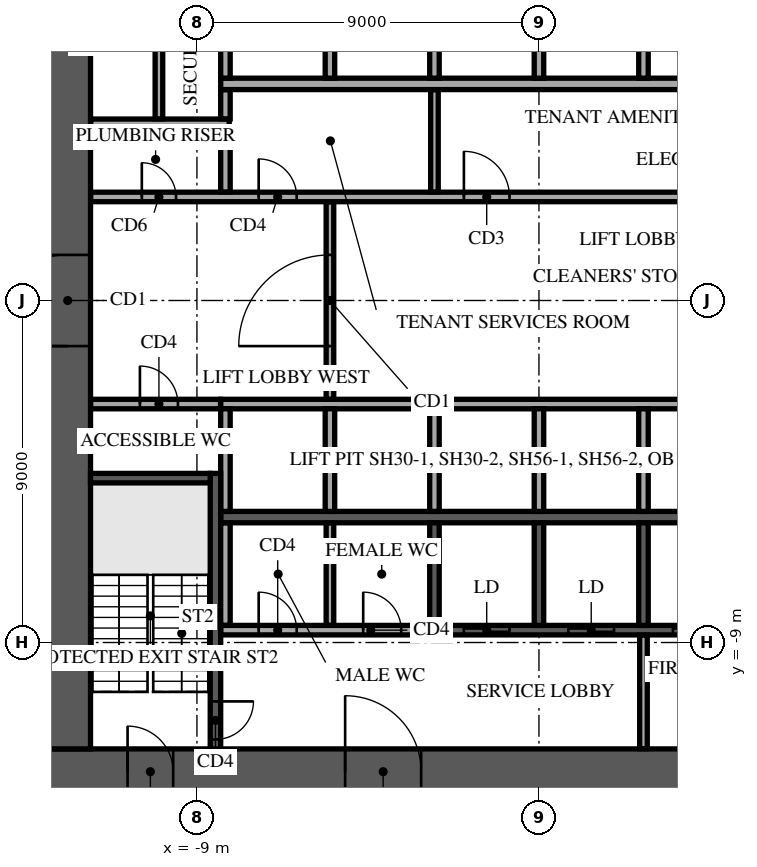
"""IFC4 building model, lengths in metres.
Left out: names, types, materials, properties, quantities, classifications, styles, units other than length and angle.
Written with IfcOpenShell. Run it as: python <this file> out.ifc"""

import sys

from ifc_helpers import new_model, si_unit, direction, frame, frame_2d, origin, place, context, subcontext, project, spatial, rectangle, extrude, element, fill, save


model = new_model("IFC4")
c1 = context("Model", 3, precision=1e-05, world=origin(), true_north=direction((0.0, 1.0)))
c2 = subcontext(c1, "Body", "Model", "MODEL_VIEW")
j1 = project(units=[si_unit("LENGTHUNIT", "METRE"), si_unit("PLANEANGLEUNIT", "RADIAN")], contexts=[c1])
p1 = place(None, origin())
s1 = spatial("IfcSite", under=j1, at=p1, CompositionType="ELEMENT")
p2 = place(p1, origin())
s2 = spatial("IfcBuilding", under=s1, at=p2, CompositionType="ELEMENT")
p3 = place(p2, frame((0.0, 0.0, -4.5)))
s3 = spatial("IfcBuildingStorey", under=s2, at=p3, CompositionType="ELEMENT", Elevation=-4.5)
p4 = place(p3, frame((-13.0, -12.4, 0.0), z_axis=(0.0, 0.0, 1.0), x_axis=(1.0, 0.0, 0.0)))
e1 = element("IfcWall", 1, at=p4, inside=s3, PredefinedType="SHEAR", context=c2, shape_type="SweptSolid", body=[
    extrude(rectangle(XDim=26.0, YDim=1.2, at=frame_2d((13.0, 0.0))), origin(), (0.0, 0.0, 1.0), 4.1),
])
p5 = place(p4, frame((7.9, 0.0, 0.0)))
e2 = element("IfcOpeningElement", 2, at=p5, cuts=e1, PredefinedType="OPENING", context=c2, shape_type="SweptSolid", body=[
    extrude(rectangle(XDim=2.0, YDim=2.1, at=frame_2d((1.0, 1.05))), frame((0.0, 0.61, 0.0), z_axis=(0.0, -1.0, 0.0), x_axis=(1.0, 0.0, 0.0)), (0.0, 0.0, 1.0), 1.22),
])
p6 = place(p4, frame((18.025, 0.0, 0.0)))
e3 = element("IfcOpeningElement", 3, at=p6, cuts=e1, PredefinedType="OPENING", context=c2, shape_type="SweptSolid", body=[
    extrude(rectangle(XDim=1.2, YDim=2.1, at=frame_2d((0.6, 1.05))), frame((0.0, 0.61, 0.0), z_axis=(0.0, -1.0, 0.0), x_axis=(1.0, 0.0, 0.0)), (0.0, 0.0, 1.0), 1.22),
])
p7 = place(p4, frame((2.175, 0.0, 0.0)))
e4 = element("IfcOpeningElement", 4, at=p7, cuts=e1, PredefinedType="OPENING", context=c2, shape_type="SweptSolid", body=[
    extrude(rectangle(XDim=1.2, YDim=2.1, at=frame_2d((0.6, 1.05))), frame((0.0, 0.61, 0.0), z_axis=(0.0, -1.0, 0.0), x_axis=(1.0, 0.0, 0.0)), (0.0, 0.0, 1.0), 1.22),
])
p8 = place(p4, frame((22.625, 0.0, 0.0)))
e5 = element("IfcOpeningElement", 5, at=p8, cuts=e1, PredefinedType="OPENING", context=c2, shape_type="SweptSolid", body=[
    extrude(rectangle(XDim=1.2, YDim=2.1, at=frame_2d((0.6, 1.05))), frame((0.0, 0.61, 0.0), z_axis=(0.0, -1.0, 0.0), x_axis=(1.0, 0.0, 0.0)), (0.0, 0.0, 1.0), 1.22),
])
p9 = place(p3, frame((-12.4, -11.8, 0.0), z_axis=(0.0, 0.0, 1.0), x_axis=(0.0, 1.0, 0.0)))
e6 = element("IfcWall", 6, at=p9, inside=s3, PredefinedType="SHEAR", context=c2, shape_type="SweptSolid", body=[
    extrude(rectangle(XDim=23.6, YDim=1.2, at=frame_2d((11.8, 0.0))), origin(), (0.0, 0.0, 1.0), 4.1),
])
p10 = place(p9, frame((10.6, 0.0, 0.0)))
e7 = element("IfcOpeningElement", 7, at=p10, cuts=e6, PredefinedType="OPENING", context=c2, shape_type="SweptSolid", body=[
    extrude(rectangle(XDim=2.4, YDim=2.4, at=frame_2d((1.2, 1.2))), frame((0.0, 0.61, 0.0), z_axis=(0.0, -1.0, 0.0), x_axis=(1.0, 0.0, 0.0)), (0.0, 0.0, 1.0), 1.22),
])
for number, where, z_axis, x_axis in (
    (8, (-8.375, 5.7, 0.0), (0.0, 0.0, 1.0), (1.0, 0.0, 0.0)),
    (9, (-8.375, -5.7, 0.0), (0.0, 0.0, 1.0), (1.0, 0.0, 0.0)),
):
    element("IfcWall", number, at=place(p3, frame(where, z_axis=z_axis, x_axis=x_axis)), inside=s3, PredefinedType="SOLIDWALL", context=c2, shape_type="SweptSolid", body=[
        extrude(rectangle(XDim=16.75, YDim=0.3, at=frame_2d((8.375, 0.0))), origin(), (0.0, 0.0, 1.0), 4.1),
    ])
for number, where, z_axis, x_axis in (
    (10, (-8.25, 5.85, 0.0), (0.0, 0.0, 1.0), (0.0, 1.0, 0.0)),
    (11, (-5.5, 5.85, 0.0), (0.0, 0.0, 1.0), (0.0, 1.0, 0.0)),
    (12, (-2.75, 5.85, 0.0), (0.0, 0.0, 1.0), (0.0, 1.0, 0.0)),
    (13, (0.0, 5.85, 0.0), (0.0, 0.0, 1.0), (0.0, 1.0, 0.0)),
    (14, (2.75, 5.85, 0.0), (0.0, 0.0, 1.0), (0.0, 1.0, 0.0)),
):
    element("IfcWall", number, at=place(p3, frame(where, z_axis=z_axis, x_axis=x_axis)), inside=s3, PredefinedType="SOLIDWALL", context=c2, shape_type="SweptSolid", body=[
        extrude(rectangle(XDim=2.7, YDim=0.25, at=frame_2d((1.35, 0.0))), origin(), (0.0, 0.0, 1.0), 4.1),
    ])
p11 = place(p3, frame((-8.375, -2.725, 0.0), z_axis=(0.0, 0.0, 1.0), x_axis=(1.0, 0.0, 0.0)))
e15 = element("IfcWall", 15, at=p11, inside=s3, PredefinedType="SOLIDWALL", context=c2, shape_type="SweptSolid", body=[
    extrude(rectangle(XDim=14.0, YDim=0.25, at=frame_2d((7.0, 0.0))), origin(), (0.0, 0.0, 1.0), 4.1),
])
for number, where, z_axis, x_axis in (
    (16, (-8.25, -5.55, 0.0), (0.0, 0.0, 1.0), (0.0, 1.0, 0.0)),
    (17, (-5.5, -5.55, 0.0), (0.0, 0.0, 1.0), (0.0, 1.0, 0.0)),
    (18, (-2.75, -5.55, 0.0), (0.0, 0.0, 1.0), (0.0, 1.0, 0.0)),
    (19, (0.0, -5.55, 0.0), (0.0, 0.0, 1.0), (0.0, 1.0, 0.0)),
    (20, (2.75, -5.55, 0.0), (0.0, 0.0, 1.0), (0.0, 1.0, 0.0)),
):
    element("IfcWall", number, at=place(p3, frame(where, z_axis=z_axis, x_axis=x_axis)), inside=s3, PredefinedType="SOLIDWALL", context=c2, shape_type="SweptSolid", body=[
        extrude(rectangle(XDim=2.7, YDim=0.25, at=frame_2d((1.35, 0.0))), origin(), (0.0, 0.0, 1.0), 4.1),
    ])
p12 = place(p3, frame((-2.875, -8.675, 0.0), z_axis=(0.0, 0.0, 1.0), x_axis=(1.0, 0.0, 0.0)))
e21 = element("IfcWall", 21, at=p12, inside=s3, PredefinedType="SOLIDWALL", context=c2, shape_type="SweptSolid", body=[
    extrude(rectangle(XDim=11.25, YDim=0.25, at=frame_2d((5.625, 0.0))), origin(), (0.0, 0.0, 1.0), 4.1),
])
p13 = place(p12, frame((0.9, 0.0, 0.0)))
e22 = element("IfcOpeningElement", 22, at=p13, cuts=e21, PredefinedType="OPENING", context=c2, shape_type="SweptSolid", body=[
    extrude(rectangle(XDim=1.2, YDim=2.1, at=frame_2d((0.6, 1.05))), frame((0.0, 0.135, 0.0), z_axis=(0.0, -1.0, 0.0), x_axis=(1.0, 0.0, 0.0)), (0.0, 0.0, 1.0), 0.27),
])
p14 = place(p12, frame((3.65, 0.0, 0.0)))
e23 = element("IfcOpeningElement", 23, at=p14, cuts=e21, PredefinedType="OPENING", context=c2, shape_type="SweptSolid", body=[
    extrude(rectangle(XDim=1.2, YDim=2.1, at=frame_2d((0.6, 1.05))), frame((0.0, 0.135, 0.0), z_axis=(0.0, -1.0, 0.0), x_axis=(1.0, 0.0, 0.0)), (0.0, 0.0, 1.0), 0.27),
])
p15 = place(p12, frame((6.4, 0.0, 0.0)))
e24 = element("IfcOpeningElement", 24, at=p15, cuts=e21, PredefinedType="OPENING", context=c2, shape_type="SweptSolid", body=[
    extrude(rectangle(XDim=1.2, YDim=2.1, at=frame_2d((0.6, 1.05))), frame((0.0, 0.135, 0.0), z_axis=(0.0, -1.0, 0.0), x_axis=(1.0, 0.0, 0.0)), (0.0, 0.0, 1.0), 0.27),
])
p16 = place(p12, frame((9.15, 0.0, 0.0)))
e25 = element("IfcOpeningElement", 25, at=p16, cuts=e21, PredefinedType="OPENING", context=c2, shape_type="SweptSolid", body=[
    extrude(rectangle(XDim=1.2, YDim=2.1, at=frame_2d((0.6, 1.05))), frame((0.0, 0.135, 0.0), z_axis=(0.0, -1.0, 0.0), x_axis=(1.0, 0.0, 0.0)), (0.0, 0.0, 1.0), 0.27),
])
for number, where, z_axis, x_axis in (
    (26, (-2.75, -8.55, 0.0), (0.0, 0.0, 1.0), (0.0, 1.0, 0.0)),
    (27, (0.0, -8.55, 0.0), (0.0, 0.0, 1.0), (0.0, 1.0, 0.0)),
    (28, (2.75, -8.55, 0.0), (0.0, 0.0, 1.0), (0.0, 1.0, 0.0)),
):
    element("IfcWall", number, at=place(p3, frame(where, z_axis=z_axis, x_axis=x_axis)), inside=s3, PredefinedType="SOLIDWALL", context=c2, shape_type="SweptSolid", body=[
        extrude(rectangle(XDim=2.7, YDim=0.25, at=frame_2d((1.35, 0.0))), origin(), (0.0, 0.0, 1.0), 4.1),
    ])
p17 = place(p3, frame((-8.512, -4.55, 0.0), z_axis=(0.0, 0.0, 1.0), x_axis=(0.0, -1.0, 0.0)))
e29 = element("IfcWall", 29, at=p17, inside=s3, PredefinedType="SOLIDWALL", context=c2, shape_type="SweptSolid", body=[
    extrude(rectangle(XDim=7.25, YDim=0.275, at=frame_2d((3.625, 0.0))), origin(), (0.0, 0.0, 1.0), 4.1),
])
p18 = place(p17, frame((6.0, 0.0, 0.0)))
e30 = element("IfcOpeningElement", 30, at=p18, cuts=e29, PredefinedType="OPENING", context=c2, shape_type="SweptSolid", body=[
    extrude(rectangle(XDim=1.0, YDim=2.1, at=frame_2d((0.5, 1.05))), frame((0.0, 0.147, 0.0), z_axis=(0.0, -1.0, 0.0), x_axis=(1.0, 0.0, 0.0)), (0.0, 0.0, 1.0), 0.295),
])
p19 = place(p3, frame((-8.65, -4.675, 0.0), z_axis=(0.0, 0.0, 1.0), x_axis=(-1.0, 0.0, 0.0)))
e31 = element("IfcWall", 31, at=p19, inside=s3, PredefinedType="SOLIDWALL", context=c2, shape_type="SweptSolid", body=[
    extrude(rectangle(XDim=3.15, YDim=0.25, at=frame_2d((1.575, 0.0))), origin(), (0.0, 0.0, 1.0), 4.1),
])
p20 = place(p3, frame((2.75, -11.795, 0.0), z_axis=(0.0, 0.0, 1.0), x_axis=(0.0, 1.0, 0.0)))
e32 = element("IfcWall", 32, at=p20, inside=s3, PredefinedType="PARTITIONING", context=c2, shape_type="SweptSolid", body=[
    extrude(rectangle(XDim=2.99, YDim=0.2, at=frame_2d((1.495, 0.0))), origin(), (0.0, 0.0, 1.0), 4.1),
])
p21 = place(p3, frame((-8.37, -8.675, 0.0), z_axis=(0.0, 0.0, 1.0), x_axis=(1.0, 0.0, 0.0)))
e33 = element("IfcWall", 33, at=p21, inside=s3, PredefinedType="PARTITIONING", context=c2, shape_type="SweptSolid", body=[
    extrude(rectangle(XDim=5.49, YDim=0.25, at=frame_2d((2.745, 0.0))), origin(), (0.0, 0.0, 1.0), 4.1),
])
p22 = place(p21, frame((0.995, 0.0, 0.0)))
e34 = element("IfcOpeningElement", 34, at=p22, cuts=e33, PredefinedType="OPENING", context=c2, shape_type="SweptSolid", body=[
    extrude(rectangle(XDim=1.0, YDim=2.1, at=frame_2d((0.5, 1.05))), frame((0.0, 0.135, 0.0), z_axis=(0.0, -1.0, 0.0), x_axis=(1.0, 0.0, 0.0)), (0.0, 0.0, 1.0), 0.27),
])
p23 = place(p21, frame((3.745, 0.0, 0.0)))
e35 = element("IfcOpeningElement", 35, at=p23, cuts=e33, PredefinedType="OPENING", context=c2, shape_type="SweptSolid", body=[
    extrude(rectangle(XDim=1.0, YDim=2.1, at=frame_2d((0.5, 1.05))), frame((0.0, 0.135, 0.0), z_axis=(0.0, -1.0, 0.0), x_axis=(1.0, 0.0, 0.0)), (0.0, 0.0, 1.0), 0.27),
])
p24 = place(p3, frame((-8.25, -8.545, 0.0), z_axis=(0.0, 0.0, 1.0), x_axis=(0.0, 1.0, 0.0)))
e36 = element("IfcWall", 36, at=p24, inside=s3, PredefinedType="PARTITIONING", context=c2, shape_type="SweptSolid", body=[
    extrude(rectangle(XDim=2.69, YDim=0.25, at=frame_2d((1.345, 0.0))), origin(), (0.0, 0.0, 1.0), 4.1),
])
p25 = place(p3, frame((-5.5, -8.545, 0.0), z_axis=(0.0, 0.0, 1.0), x_axis=(0.0, 1.0, 0.0)))
e37 = element("IfcWall", 37, at=p25, inside=s3, PredefinedType="PARTITIONING", context=c2, shape_type="SweptSolid", body=[
    extrude(rectangle(XDim=2.69, YDim=0.2, at=frame_2d((1.345, 0.0))), origin(), (0.0, 0.0, 1.0), 4.1),
])
p26 = place(p3, frame((-11.795, -2.725, 0.0), z_axis=(0.0, 0.0, 1.0), x_axis=(1.0, 0.0, 0.0)))
e38 = element("IfcWall", 38, at=p26, inside=s3, PredefinedType="PARTITIONING", context=c2, shape_type="SweptSolid", body=[
    extrude(rectangle(XDim=3.415, YDim=0.25, at=frame_2d((1.708, 0.0))), origin(), (0.0, 0.0, 1.0), 4.1),
])
p27 = place(p26, frame((1.295, 0.0, 0.0)))
e39 = element("IfcOpeningElement", 39, at=p27, cuts=e38, PredefinedType="OPENING", context=c2, shape_type="SweptSolid", body=[
    extrude(rectangle(XDim=1.0, YDim=2.1, at=frame_2d((0.5, 1.05))), frame((0.0, 0.135, 0.0), z_axis=(0.0, -1.0, 0.0), x_axis=(1.0, 0.0, 0.0)), (0.0, 0.0, 1.0), 0.27),
])
p28 = place(p3, frame((-5.5, -2.595, 0.0), z_axis=(0.0, 0.0, 1.0), x_axis=(0.0, 1.0, 0.0)))
e40 = element("IfcWall", 40, at=p28, inside=s3, PredefinedType="PARTITIONING", context=c2, shape_type="SweptSolid", body=[
    extrude(rectangle(XDim=5.19, YDim=0.2, at=frame_2d((2.595, 0.0))), origin(), (0.0, 0.0, 1.0), 4.1),
])
p29 = place(p28, frame((1.395, 0.0, 0.0)))
e41 = element("IfcOpeningElement", 41, at=p29, cuts=e40, PredefinedType="OPENING", context=c2, shape_type="SweptSolid", body=[
    extrude(rectangle(XDim=2.4, YDim=2.4, at=frame_2d((1.2, 1.2))), frame((0.0, 0.11, 0.0), z_axis=(0.0, -1.0, 0.0), x_axis=(1.0, 0.0, 0.0)), (0.0, 0.0, 1.0), 0.22),
])
p30 = place(p3, frame((-11.795, 2.725, 0.0), z_axis=(0.0, 0.0, 1.0), x_axis=(1.0, 0.0, 0.0)))
e42 = element("IfcWall", 42, at=p30, inside=s3, PredefinedType="PARTITIONING", context=c2, shape_type="SweptSolid", body=[
    extrude(rectangle(XDim=23.59, YDim=0.25, at=frame_2d((11.795, 0.0))), origin(), (0.0, 0.0, 1.0), 4.1),
])
p31 = place(p30, frame((21.345, 0.0, 0.0)))
e43 = element("IfcOpeningElement", 43, at=p31, cuts=e42, PredefinedType="OPENING", context=c2, shape_type="SweptSolid", body=[
    extrude(rectangle(XDim=0.9, YDim=2.1, at=frame_2d((0.45, 1.05))), frame((0.0, 0.135, 0.0), z_axis=(0.0, -1.0, 0.0), x_axis=(1.0, 0.0, 0.0)), (0.0, 0.0, 1.0), 0.27),
])
p32 = place(p30, frame((1.345, 0.0, 0.0)))
e44 = element("IfcOpeningElement", 44, at=p32, cuts=e42, PredefinedType="OPENING", context=c2, shape_type="SweptSolid", body=[
    extrude(rectangle(XDim=0.9, YDim=2.1, at=frame_2d((0.45, 1.05))), frame((0.0, 0.135, 0.0), z_axis=(0.0, -1.0, 0.0), x_axis=(1.0, 0.0, 0.0)), (0.0, 0.0, 1.0), 0.27),
])
p33 = place(p30, frame((4.42, 0.0, 0.0)))
e45 = element("IfcOpeningElement", 45, at=p33, cuts=e42, PredefinedType="OPENING", context=c2, shape_type="SweptSolid", body=[
    extrude(rectangle(XDim=1.0, YDim=2.1, at=frame_2d((0.5, 1.05))), frame((0.0, 0.135, 0.0), z_axis=(0.0, -1.0, 0.0), x_axis=(1.0, 0.0, 0.0)), (0.0, 0.0, 1.0), 0.27),
])
p34 = place(p30, frame((9.82, 0.0, 0.0)))
e46 = element("IfcOpeningElement", 46, at=p34, cuts=e42, PredefinedType="OPENING", context=c2, shape_type="SweptSolid", body=[
    extrude(rectangle(XDim=1.2, YDim=2.1, at=frame_2d((0.6, 1.05))), frame((0.0, 0.135, 0.0), z_axis=(0.0, -1.0, 0.0), x_axis=(1.0, 0.0, 0.0)), (0.0, 0.0, 1.0), 0.27),
])
p35 = place(p3, frame((-8.25, 2.855, 0.0), z_axis=(0.0, 0.0, 1.0), x_axis=(0.0, 1.0, 0.0)))
e47 = element("IfcWall", 47, at=p35, inside=s3, PredefinedType="PARTITIONING", context=c2, shape_type="SweptSolid", body=[
    extrude(rectangle(XDim=1.715, YDim=0.25, at=frame_2d((0.857, 0.0))), origin(), (0.0, 0.0, 1.0), 4.1),
])
p36 = place(p3, frame((-2.75, 2.855, 0.0), z_axis=(0.0, 0.0, 1.0), x_axis=(0.0, 1.0, 0.0)))
e48 = element("IfcWall", 48, at=p36, inside=s3, PredefinedType="PARTITIONING", context=c2, shape_type="SweptSolid", body=[
    extrude(rectangle(XDim=2.69, YDim=0.2, at=frame_2d((1.345, 0.0))), origin(), (0.0, 0.0, 1.0), 4.1),
])
p37 = place(p3, frame((-11.795, 4.675, 0.0), z_axis=(0.0, 0.0, 1.0), x_axis=(1.0, 0.0, 0.0)))
e49 = element("IfcWall", 49, at=p37, inside=s3, PredefinedType="PARTITIONING", context=c2, shape_type="SweptSolid", body=[
    extrude(rectangle(XDim=3.645, YDim=0.2, at=frame_2d((1.823, 0.0))), origin(), (0.0, 0.0, 1.0), 4.1),
])
p38 = place(p3, frame((-10.0, 4.78, 0.0), z_axis=(0.0, 0.0, 1.0), x_axis=(0.0, 1.0, 0.0)))
e50 = element("IfcWall", 50, at=p38, inside=s3, PredefinedType="PARTITIONING", context=c2, shape_type="SweptSolid", body=[
    extrude(rectangle(XDim=7.015, YDim=0.2, at=frame_2d((3.507, 0.0))), origin(), (0.0, 0.0, 1.0), 4.1),
])
p39 = place(p38, frame((2.92, 0.0, 0.0)))
e51 = element("IfcOpeningElement", 51, at=p39, cuts=e50, PredefinedType="OPENING", context=c2, shape_type="SweptSolid", body=[
    extrude(rectangle(XDim=1.0, YDim=2.1, at=frame_2d((0.5, 1.05))), frame((0.0, 0.11, 0.0), z_axis=(0.0, -1.0, 0.0), x_axis=(1.0, 0.0, 0.0)), (0.0, 0.0, 1.0), 0.22),
])
p40 = place(p3, frame((-8.25, 4.78, 0.0), z_axis=(0.0, 0.0, 1.0), x_axis=(0.0, 1.0, 0.0)))
e52 = element("IfcWall", 52, at=p40, inside=s3, PredefinedType="PARTITIONING", context=c2, shape_type="SweptSolid", body=[
    extrude(rectangle(XDim=0.765, YDim=0.25, at=frame_2d((0.382, 0.0))), origin(), (0.0, 0.0, 1.0), 4.1),
])
p41 = place(p5, origin())
e53 = element("IfcDoor", 53, at=p41, inside=s3, OperationType="SINGLE_SWING_LEFT", PredefinedType="DOOR", context=c2, shape_type="SweptSolid", body=[
    extrude(rectangle(XDim=2.0, YDim=2.1, at=frame_2d((1.0, 1.05))), frame((0.0, 0.025, 0.0), z_axis=(0.0, -1.0, 0.0), x_axis=(1.0, 0.0, 0.0)), (0.0, 0.0, 1.0), 0.05),
])
fill(e2, e53)
p42 = place(p7, origin())
e54 = element("IfcDoor", 54, at=p42, inside=s3, OperationType="SINGLE_SWING_LEFT", PredefinedType="DOOR", context=c2, shape_type="SweptSolid", body=[
    extrude(rectangle(XDim=1.2, YDim=2.1, at=frame_2d((0.6, 1.05))), frame((0.0, 0.025, 0.0), z_axis=(0.0, -1.0, 0.0), x_axis=(1.0, 0.0, 0.0)), (0.0, 0.0, 1.0), 0.05),
])
fill(e4, e54)
p43 = place(p10, origin())
e55 = element("IfcDoor", 55, at=p43, inside=s3, OperationType="SINGLE_SWING_LEFT", PredefinedType="DOOR", context=c2, shape_type="SweptSolid", body=[
    extrude(rectangle(XDim=2.4, YDim=2.4, at=frame_2d((1.2, 1.2))), frame((0.0, 0.025, 0.0), z_axis=(0.0, -1.0, 0.0), x_axis=(1.0, 0.0, 0.0)), (0.0, 0.0, 1.0), 0.05),
])
fill(e7, e55)
p44 = place(p13, origin())
e56 = element("IfcDoor", 56, at=p44, inside=s3, OperationType="DOUBLE_DOOR_SLIDING", PredefinedType="DOOR", context=c2, shape_type="SweptSolid", body=[
    extrude(rectangle(XDim=1.2, YDim=2.1, at=frame_2d((0.6, 1.05))), frame((0.0, 0.025, 0.0), z_axis=(0.0, -1.0, 0.0), x_axis=(1.0, 0.0, 0.0)), (0.0, 0.0, 1.0), 0.05),
])
fill(e22, e56)
p45 = place(p14, origin())
e57 = element("IfcDoor", 57, at=p45, inside=s3, OperationType="DOUBLE_DOOR_SLIDING", PredefinedType="DOOR", context=c2, shape_type="SweptSolid", body=[
    extrude(rectangle(XDim=1.2, YDim=2.1, at=frame_2d((0.6, 1.05))), frame((0.0, 0.025, 0.0), z_axis=(0.0, -1.0, 0.0), x_axis=(1.0, 0.0, 0.0)), (0.0, 0.0, 1.0), 0.05),
])
fill(e23, e57)
p46 = place(p15, origin())
e58 = element("IfcDoor", 58, at=p46, inside=s3, OperationType="DOUBLE_DOOR_SLIDING", PredefinedType="DOOR", context=c2, shape_type="SweptSolid", body=[
    extrude(rectangle(XDim=1.2, YDim=2.1, at=frame_2d((0.6, 1.05))), frame((0.0, 0.025, 0.0), z_axis=(0.0, -1.0, 0.0), x_axis=(1.0, 0.0, 0.0)), (0.0, 0.0, 1.0), 0.05),
])
fill(e24, e58)
p47 = place(p18, origin())
e59 = element("IfcDoor", 59, at=p47, inside=s3, OperationType="SINGLE_SWING_LEFT", PredefinedType="DOOR", context=c2, shape_type="SweptSolid", body=[
    extrude(rectangle(XDim=1.0, YDim=2.1, at=frame_2d((0.5, 1.05))), frame((0.0, 0.025, 0.0), z_axis=(0.0, -1.0, 0.0), x_axis=(1.0, 0.0, 0.0)), (0.0, 0.0, 1.0), 0.05),
])
fill(e30, e59)
p48 = place(p22, origin())
e60 = element("IfcDoor", 60, at=p48, inside=s3, OperationType="SINGLE_SWING_RIGHT", PredefinedType="DOOR", context=c2, shape_type="SweptSolid", body=[
    extrude(rectangle(XDim=1.0, YDim=2.1, at=frame_2d((0.5, 1.05))), frame((0.0, 0.025, 0.0), z_axis=(0.0, -1.0, 0.0), x_axis=(1.0, 0.0, 0.0)), (0.0, 0.0, 1.0), 0.05),
])
fill(e34, e60)
p49 = place(p23, origin())
e61 = element("IfcDoor", 61, at=p49, inside=s3, OperationType="SINGLE_SWING_RIGHT", PredefinedType="DOOR", context=c2, shape_type="SweptSolid", body=[
    extrude(rectangle(XDim=1.0, YDim=2.1, at=frame_2d((0.5, 1.05))), frame((0.0, 0.025, 0.0), z_axis=(0.0, -1.0, 0.0), x_axis=(1.0, 0.0, 0.0)), (0.0, 0.0, 1.0), 0.05),
])
fill(e35, e61)
p50 = place(p27, origin())
e62 = element("IfcDoor", 62, at=p50, inside=s3, OperationType="SINGLE_SWING_RIGHT", PredefinedType="DOOR", context=c2, shape_type="SweptSolid", body=[
    extrude(rectangle(XDim=1.0, YDim=2.1, at=frame_2d((0.5, 1.05))), frame((0.0, 0.025, 0.0), z_axis=(0.0, -1.0, 0.0), x_axis=(1.0, 0.0, 0.0)), (0.0, 0.0, 1.0), 0.05),
])
fill(e39, e62)
p51 = place(p32, origin())
e63 = element("IfcDoor", 63, at=p51, inside=s3, OperationType="SINGLE_SWING_RIGHT", PredefinedType="DOOR", context=c2, shape_type="SweptSolid", body=[
    extrude(rectangle(XDim=0.9, YDim=2.1, at=frame_2d((0.45, 1.05))), frame((0.0, 0.025, 0.0), z_axis=(0.0, -1.0, 0.0), x_axis=(1.0, 0.0, 0.0)), (0.0, 0.0, 1.0), 0.05),
])
fill(e44, e63)
p52 = place(p33, origin())
e64 = element("IfcDoor", 64, at=p52, inside=s3, OperationType="SINGLE_SWING_RIGHT", PredefinedType="DOOR", context=c2, shape_type="SweptSolid", body=[
    extrude(rectangle(XDim=1.0, YDim=2.1, at=frame_2d((0.5, 1.05))), frame((0.0, 0.025, 0.0), z_axis=(0.0, -1.0, 0.0), x_axis=(1.0, 0.0, 0.0)), (0.0, 0.0, 1.0), 0.05),
])
fill(e45, e64)
p53 = place(p34, origin())
e65 = element("IfcDoor", 65, at=p53, inside=s3, OperationType="SINGLE_SWING_LEFT", PredefinedType="DOOR", context=c2, shape_type="SweptSolid", body=[
    extrude(rectangle(XDim=1.2, YDim=2.1, at=frame_2d((0.6, 1.05))), frame((0.0, 0.025, 0.0), z_axis=(0.0, -1.0, 0.0), x_axis=(1.0, 0.0, 0.0)), (0.0, 0.0, 1.0), 0.05),
])
fill(e46, e65)
p54 = place(p29, origin())
e66 = element("IfcDoor", 66, at=p54, inside=s3, OperationType="DOUBLE_DOOR_DOUBLE_SWING", PredefinedType="DOOR", context=c2, shape_type="SweptSolid", body=[
    extrude(rectangle(XDim=2.4, YDim=2.4, at=frame_2d((1.2, 1.2))), frame((0.0, 0.025, 0.0), z_axis=(0.0, -1.0, 0.0), x_axis=(1.0, 0.0, 0.0)), (0.0, 0.0, 1.0), 0.05),
])
fill(e41, e66)
save(model, sys.argv[1])
